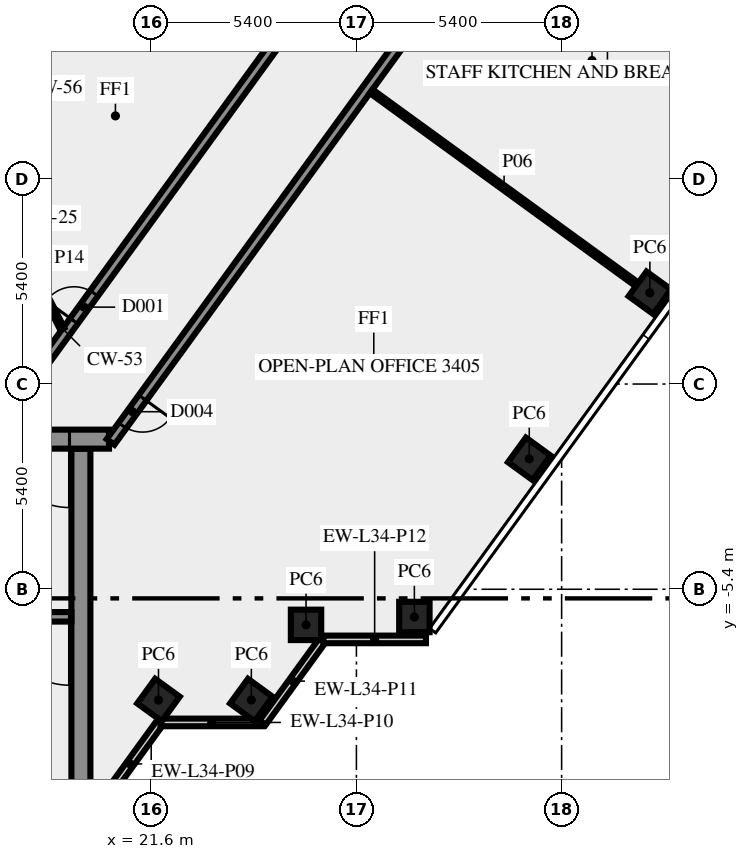
"""IFC4 building model, lengths in metres.
Left out: names, types, materials, properties, quantities, classifications, styles, units other than length and angle.
Written with IfcOpenShell. Run it as: python <this file> out.ifc"""

import sys

from ifc_helpers import new_model, si_unit, direction, frame, frame_2d, origin, origin_2d, place, context, subcontext, project, spatial, rectangle, extrude, element, fill, save


model = new_model("IFC4")
c1 = context("Model", 3, precision=1e-05, world=origin(), true_north=direction((0.0, 1.0)))
c2 = subcontext(c1, "Body", "Model", "MODEL_VIEW")
j1 = project(units=[si_unit("LENGTHUNIT", "METRE"), si_unit("PLANEANGLEUNIT", "RADIAN")], contexts=[c1])
p1 = place(None, origin())
s1 = spatial("IfcSite", under=j1, at=p1, CompositionType="ELEMENT")
p2 = place(p1, origin())
s2 = spatial("IfcBuilding", under=s1, at=p2, CompositionType="ELEMENT")
p3 = place(p2, frame((0.0, 0.0, 148.0)))
s3 = spatial("IfcBuildingStorey", under=s2, at=p3, CompositionType="ELEMENT", Elevation=148.0)
for number, where, z_axis, x_axis in (
    (1, (21.792, -8.315, 0.0), (0.0, 0.0, 1.0), (0.588, 0.809, 0.0)),
    (2, (24.235, -8.315, 0.0), (0.0, 0.0, 1.0), (0.588, 0.809, 0.0)),
    (3, (25.674, -6.337, 0.0), (0.0, 0.0, 1.0), (1.0, 0.0, 0.0)),
    (4, (28.525, -6.13, 0.0), (0.0, 0.0, 1.0), (1.0, 0.0, 0.0)),
    (5, (31.548, -1.969, 0.0), (0.0, 0.0, 1.0), (0.588, 0.809, 0.0)),
    (6, (34.722, 2.4, 0.0), (0.0, 0.0, 1.0), (0.588, 0.809, 0.0)),
):
    element("IfcColumn", number, at=place(p3, frame(where, z_axis=z_axis, x_axis=x_axis)), inside=s3, PredefinedType="COLUMN", context=c2, shape_type="SweptSolid", body=[
        extrude(rectangle(XDim=0.8, YDim=0.8, at=origin_2d()), origin(), (0.0, 0.0, 1.0), 3.65),
    ])
p4 = place(p3, frame((20.253, -11.083, 0.0), z_axis=(0.0, 0.0, 1.0), x_axis=(0.587766567315, 0.809030569476, 0.0)))
e7 = element("IfcWall", 7, at=p4, inside=s3, PredefinedType="SOLIDWALL", context=c2, shape_type="SweptSolid", body=[
    extrude(rectangle(XDim=2.688, YDim=0.2, at=frame_2d((1.344, 0.0))), origin(), (0.0, 0.0, 1.0), 3.65),
])
p5 = place(p3, frame((21.843, -8.904, 0.0), z_axis=(0.0, 0.0, 1.0), x_axis=(1.0, 0.0, 0.0)))
e8 = element("IfcWall", 8, at=p5, inside=s3, PredefinedType="SOLIDWALL", context=c2, shape_type="SweptSolid", body=[
    extrude(rectangle(XDim=2.7, YDim=0.2, at=frame_2d((1.35, 0.0))), origin(), (0.0, 0.0, 1.0), 3.65),
])
p6 = place(p3, frame((24.533, -8.909, 0.0), z_axis=(0.0, 0.0, 1.0), x_axis=(0.587720002413, 0.809064397168, 0.0)))
e9 = element("IfcWall", 9, at=p6, inside=s3, PredefinedType="SOLIDWALL", context=c2, shape_type="SweptSolid", body=[
    extrude(rectangle(XDim=2.7, YDim=0.2, at=frame_2d((1.35, 0.0))), origin(), (0.0, 0.0, 1.0), 3.65),
])
p7 = place(p3, frame((26.13, -6.719, 0.0), z_axis=(0.0, 0.0, 1.0), x_axis=(1.0, 0.0, 0.0)))
e10 = element("IfcWall", 10, at=p7, inside=s3, PredefinedType="SOLIDWALL", context=c2, shape_type="SweptSolid", body=[
    extrude(rectangle(XDim=2.7, YDim=0.2, at=frame_2d((1.35, 0.0))), origin(), (0.0, 0.0, 1.0), 3.65),
])
p8 = place(p3, frame((19.75, -10.5, 0.0), z_axis=(0.0, 0.0, 1.0), x_axis=(0.0, 1.0, 0.0)))
e11 = element("IfcWall", 11, at=p8, inside=s3, PredefinedType="SHEAR", context=c2, shape_type="SweptSolid", body=[
    extrude(rectangle(XDim=8.8, YDim=0.5, at=frame_2d((4.4, 0.0))), origin(), (0.0, 0.0, 1.0), 3.65),
])
p9 = place(p3, frame((19.5, -6.125, 0.0), z_axis=(0.0, 0.0, 1.0), x_axis=(-1.0, 0.0, 0.0)))
e12 = element("IfcWall", 12, at=p9, inside=s3, PredefinedType="SHEAR", context=c2, shape_type="SweptSolid", body=[
    extrude(rectangle(XDim=8.05, YDim=0.25, at=frame_2d((4.025, 0.0))), origin(), (0.0, 0.0, 1.0), 3.65),
])
p10 = place(p9, frame((0.05, 0.0, 0.0)))
e13 = element("IfcOpeningElement", 13, at=p10, cuts=e12, PredefinedType="OPENING", context=c2, shape_type="SweptSolid", body=[
    extrude(rectangle(XDim=1.8, YDim=2.1, at=frame_2d((0.9, 1.05))), frame((0.0, 0.135, 0.0), z_axis=(0.0, -1.0, 0.0), x_axis=(1.0, 0.0, 0.0)), (0.0, 0.0, 1.0), 0.27),
])
p11 = place(p3, frame((20.49, -1.45, 0.0), z_axis=(0.0, 0.0, 1.0), x_axis=(-1.0, 0.0, 0.0)))
e14 = element("IfcWall", 14, at=p11, inside=s3, PredefinedType="SHEAR", context=c2, shape_type="SweptSolid", body=[
    extrude(rectangle(XDim=40.98, YDim=0.5, at=frame_2d((20.49, 0.0))), origin(), (0.0, 0.0, 1.0), 3.65),
])
p12 = place(p11, frame((38.14, 0.0, 0.0)))
e15 = element("IfcOpeningElement", 15, at=p12, cuts=e14, PredefinedType="OPENING", context=c2, shape_type="SweptSolid", body=[
    extrude(rectangle(XDim=1.8, YDim=2.1, at=frame_2d((0.9, 1.05))), frame((0.0, 0.26, 0.0), z_axis=(0.0, -1.0, 0.0), x_axis=(1.0, 0.0, 0.0)), (0.0, 0.0, 1.0), 0.52),
])
p13 = place(p11, frame((35.89, 0.0, 0.0)))
e16 = element("IfcOpeningElement", 16, at=p13, cuts=e14, PredefinedType="OPENING", context=c2, shape_type="SweptSolid", body=[
    extrude(rectangle(XDim=0.9, YDim=2.1, at=frame_2d((0.45, 1.05))), frame((0.0, 0.26, 0.0), z_axis=(0.0, -1.0, 0.0), x_axis=(1.0, 0.0, 0.0)), (0.0, 0.0, 1.0), 0.52),
])
p14 = place(p11, frame((32.94, 0.0, 0.0)))
e17 = element("IfcOpeningElement", 17, at=p14, cuts=e14, PredefinedType="OPENING", context=c2, shape_type="SweptSolid", body=[
    extrude(rectangle(XDim=0.9, YDim=2.1, at=frame_2d((0.45, 1.05))), frame((0.0, 0.26, 0.0), z_axis=(0.0, -1.0, 0.0), x_axis=(1.0, 0.0, 0.0)), (0.0, 0.0, 1.0), 0.52),
])
p15 = place(p11, frame((29.802, 0.0, 0.0)))
e18 = element("IfcOpeningElement", 18, at=p15, cuts=e14, PredefinedType="OPENING", context=c2, shape_type="SweptSolid", body=[
    extrude(rectangle(XDim=0.9, YDim=2.1, at=frame_2d((0.45, 1.05))), frame((0.0, 0.26, 0.0), z_axis=(0.0, -1.0, 0.0), x_axis=(1.0, 0.0, 0.0)), (0.0, 0.0, 1.0), 0.52),
])
p16 = place(p11, frame((26.077, 0.0, 0.0)))
e19 = element("IfcOpeningElement", 19, at=p16, cuts=e14, PredefinedType="OPENING", context=c2, shape_type="SweptSolid", body=[
    extrude(rectangle(XDim=0.9, YDim=2.1, at=frame_2d((0.45, 1.05))), frame((0.0, 0.26, 0.0), z_axis=(0.0, -1.0, 0.0), x_axis=(1.0, 0.0, 0.0)), (0.0, 0.0, 1.0), 0.52),
])
p17 = place(p11, frame((19.59, 0.0, 0.0)))
e20 = element("IfcOpeningElement", 20, at=p17, cuts=e14, PredefinedType="OPENING", context=c2, shape_type="SweptSolid", body=[
    extrude(rectangle(XDim=2.0, YDim=2.1, at=frame_2d((1.0, 1.05))), frame((0.0, 0.26, 0.0), z_axis=(0.0, -1.0, 0.0), x_axis=(1.0, 0.0, 0.0)), (0.0, 0.0, 1.0), 0.52),
])
p18 = place(p11, frame((7.14, 0.0, 0.0)))
e21 = element("IfcOpeningElement", 21, at=p18, cuts=e14, PredefinedType="OPENING", context=c2, shape_type="SweptSolid", body=[
    extrude(rectangle(XDim=0.9, YDim=2.1, at=frame_2d((0.45, 1.05))), frame((0.0, 0.26, 0.0), z_axis=(0.0, -1.0, 0.0), x_axis=(1.0, 0.0, 0.0)), (0.0, 0.0, 1.0), 0.52),
])
p19 = place(p11, frame((5.028, 0.0, 0.0)))
e22 = element("IfcOpeningElement", 22, at=p19, cuts=e14, PredefinedType="OPENING", context=c2, shape_type="SweptSolid", body=[
    extrude(rectangle(XDim=0.8, YDim=2.1, at=frame_2d((0.4, 1.05))), frame((0.0, 0.26, 0.0), z_axis=(0.0, -1.0, 0.0), x_axis=(1.0, 0.0, 0.0)), (0.0, 0.0, 1.0), 0.52),
])
p20 = place(p11, frame((3.452, 0.0, 0.0)))
e23 = element("IfcOpeningElement", 23, at=p20, cuts=e14, PredefinedType="OPENING", context=c2, shape_type="SweptSolid", body=[
    extrude(rectangle(XDim=0.8, YDim=2.1, at=frame_2d((0.4, 1.05))), frame((0.0, 0.26, 0.0), z_axis=(0.0, -1.0, 0.0), x_axis=(1.0, 0.0, 0.0)), (0.0, 0.0, 1.0), 0.52),
])
p21 = place(p11, frame((1.04, 0.0, 0.0)))
e24 = element("IfcOpeningElement", 24, at=p21, cuts=e14, PredefinedType="OPENING", context=c2, shape_type="SweptSolid", body=[
    extrude(rectangle(XDim=1.8, YDim=2.1, at=frame_2d((0.9, 1.05))), frame((0.0, 0.26, 0.0), z_axis=(0.0, -1.0, 0.0), x_axis=(1.0, 0.0, 0.0)), (0.0, 0.0, 1.0), 0.52),
])
p22 = place(p3, frame((17.545, -1.125, 0.0), z_axis=(0.0, 0.0, 1.0), x_axis=(0.587786330937, 0.809016210693, 0.0)))
e25 = element("IfcWall", 25, at=p22, inside=s3, PredefinedType="SOLIDWALL", context=c2, shape_type="SweptSolid", body=[
    extrude(rectangle(XDim=30.103, YDim=0.25, at=frame_2d((15.052, 0.0))), origin(), (0.0, 0.0, 1.0), 3.65),
])
p23 = place(p22, frame((3.441, 0.0, 0.0)))
e26 = element("IfcOpeningElement", 26, at=p23, cuts=e25, PredefinedType="OPENING", context=c2, shape_type="SweptSolid", body=[
    extrude(rectangle(XDim=0.9, YDim=2.1, at=frame_2d((0.45, 1.05))), frame((0.0, 0.135, 0.0), z_axis=(0.0, -1.0, 0.0), x_axis=(1.0, 0.0, 0.0)), (0.0, 0.0, 1.0), 0.27),
])
p24 = place(p22, frame((20.457, 0.0, 0.0)))
e27 = element("IfcOpeningElement", 27, at=p24, cuts=e25, PredefinedType="OPENING", context=c2, shape_type="SweptSolid", body=[
    extrude(rectangle(XDim=0.9, YDim=2.1, at=frame_2d((0.45, 1.05))), frame((0.0, 0.135, 0.0), z_axis=(0.0, -1.0, 0.0), x_axis=(1.0, 0.0, 0.0)), (0.0, 0.0, 1.0), 0.27),
])
p25 = place(p22, frame((18.858, 0.0, 0.0)))
e28 = element("IfcOpeningElement", 28, at=p25, cuts=e25, PredefinedType="OPENING", context=c2, shape_type="SweptSolid", body=[
    extrude(rectangle(XDim=0.9, YDim=2.1, at=frame_2d((0.45, 1.05))), frame((0.0, 0.135, 0.0), z_axis=(0.0, -1.0, 0.0), x_axis=(1.0, 0.0, 0.0)), (0.0, 0.0, 1.0), 0.27),
])
p26 = place(p3, frame((37.236, 21.469, 0.0), z_axis=(0.0, 0.0, 1.0), x_axis=(-0.58778344073, -0.809018310549, 0.0)))
e29 = element("IfcWall", 29, at=p26, inside=s3, PredefinedType="SOLIDWALL", context=c2, shape_type="SweptSolid", body=[
    extrude(rectangle(XDim=28.42, YDim=0.25, at=frame_2d((14.21, 0.0))), origin(), (0.0, 0.0, 1.0), 3.65),
])
p27 = place(p26, frame((26.988, 0.0, 0.0)))
e30 = element("IfcOpeningElement", 30, at=p27, cuts=e29, PredefinedType="OPENING", context=c2, shape_type="SweptSolid", body=[
    extrude(rectangle(XDim=0.9, YDim=2.1, at=frame_2d((0.45, 1.05))), frame((0.0, 0.135, 0.0), z_axis=(0.0, -1.0, 0.0), x_axis=(1.0, 0.0, 0.0)), (0.0, 0.0, 1.0), 0.27),
])
p28 = place(p26, frame((0.224, 0.0, 0.0)))
e31 = element("IfcOpeningElement", 31, at=p28, cuts=e29, PredefinedType="OPENING", context=c2, shape_type="SweptSolid", body=[
    extrude(rectangle(XDim=0.9, YDim=2.1, at=frame_2d((0.45, 1.05))), frame((0.0, 0.135, 0.0), z_axis=(0.0, -1.0, 0.0), x_axis=(1.0, 0.0, 0.0)), (0.0, 0.0, 1.0), 0.27),
])
p29 = place(p26, frame((9.155, 0.0, 0.0)))
e32 = element("IfcOpeningElement", 32, at=p29, cuts=e29, PredefinedType="OPENING", context=c2, shape_type="SweptSolid", body=[
    extrude(rectangle(XDim=0.9, YDim=2.1, at=frame_2d((0.45, 1.05))), frame((0.0, 0.135, 0.0), z_axis=(0.0, -1.0, 0.0), x_axis=(1.0, 0.0, 0.0)), (0.0, 0.0, 1.0), 0.27),
])
p30 = place(p3, frame((34.383, 2.622, 0.0), z_axis=(0.0, 0.0, 1.0), x_axis=(-0.809060825193, 0.587724919617, 0.0)))
e33 = element("IfcWall", 33, at=p30, inside=s3, PredefinedType="PARTITIONING", context=c2, shape_type="SweptSolid", body=[
    extrude(rectangle(XDim=8.645, YDim=0.12, at=frame_2d((4.322, 0.0))), origin(), (0.0, 0.0, 1.0), 3.65),
])
p31 = place(p3, frame((32.174, 14.288, 0.0), z_axis=(0.0, 0.0, 1.0), x_axis=(0.807664588563, -0.589642190131, 0.0)))
e34 = element("IfcWall", 34, at=p31, inside=s3, PredefinedType="SOLIDWALL", context=c2, shape_type="SweptSolid", body=[
    extrude(rectangle(XDim=9.55, YDim=0.2, at=frame_2d((4.775, 0.0))), origin(), (0.0, 0.0, 1.0), 2.85),
])
p32 = place(p3, frame((18.0, 3.925, 0.0), z_axis=(0.0, 0.0, 1.0), x_axis=(0.453950796792, -0.891026752736, 0.0)))
e35 = element("IfcWall", 35, at=p32, inside=s3, PredefinedType="PARTITIONING", context=c2, shape_type="SweptSolid", body=[
    extrude(rectangle(XDim=2.778, YDim=0.12, at=frame_2d((1.389, 0.0))), origin(), (0.0, 0.0, 1.0), 3.65),
])
p33 = place(p10, origin())
e36 = element("IfcDoor", 36, at=p33, inside=s3, OperationType="DOUBLE_DOOR_SINGLE_SWING", PredefinedType="DOOR", context=c2, shape_type="SweptSolid", body=[
    extrude(rectangle(XDim=1.8, YDim=2.1, at=frame_2d((0.9, 1.05))), frame((0.0, 0.025, 0.0), z_axis=(0.0, -1.0, 0.0), x_axis=(1.0, 0.0, 0.0)), (0.0, 0.0, 1.0), 0.05),
])
fill(e13, e36)
p34 = place(p21, origin())
e37 = element("IfcDoor", 37, at=p34, inside=s3, OperationType="DOUBLE_DOOR_SINGLE_SWING", PredefinedType="DOOR", context=c2, shape_type="SweptSolid", body=[
    extrude(rectangle(XDim=1.8, YDim=2.1, at=frame_2d((0.9, 1.05))), frame((0.0, 0.025, 0.0), z_axis=(0.0, -1.0, 0.0), x_axis=(1.0, 0.0, 0.0)), (0.0, 0.0, 1.0), 0.05),
])
fill(e24, e37)
p35 = place(p23, origin())
e38 = element("IfcDoor", 38, at=p35, inside=s3, OperationType="SINGLE_SWING_LEFT", PredefinedType="DOOR", context=c2, shape_type="SweptSolid", body=[
    extrude(rectangle(XDim=0.9, YDim=2.1, at=frame_2d((0.45, 1.05))), frame((0.0, 0.025, 0.0), z_axis=(0.0, -1.0, 0.0), x_axis=(1.0, 0.0, 0.0)), (0.0, 0.0, 1.0), 0.05),
])
fill(e26, e38)
p36 = place(p27, origin())
e39 = element("IfcDoor", 39, at=p36, inside=s3, OperationType="SINGLE_SWING_RIGHT", PredefinedType="DOOR", context=c2, shape_type="SweptSolid", body=[
    extrude(rectangle(XDim=0.9, YDim=2.1, at=frame_2d((0.45, 1.05))), frame((0.0, 0.025, 0.0), z_axis=(0.0, -1.0, 0.0), x_axis=(1.0, 0.0, 0.0)), (0.0, 0.0, 1.0), 0.05),
])
fill(e30, e39)
save(model, sys.argv[1])
